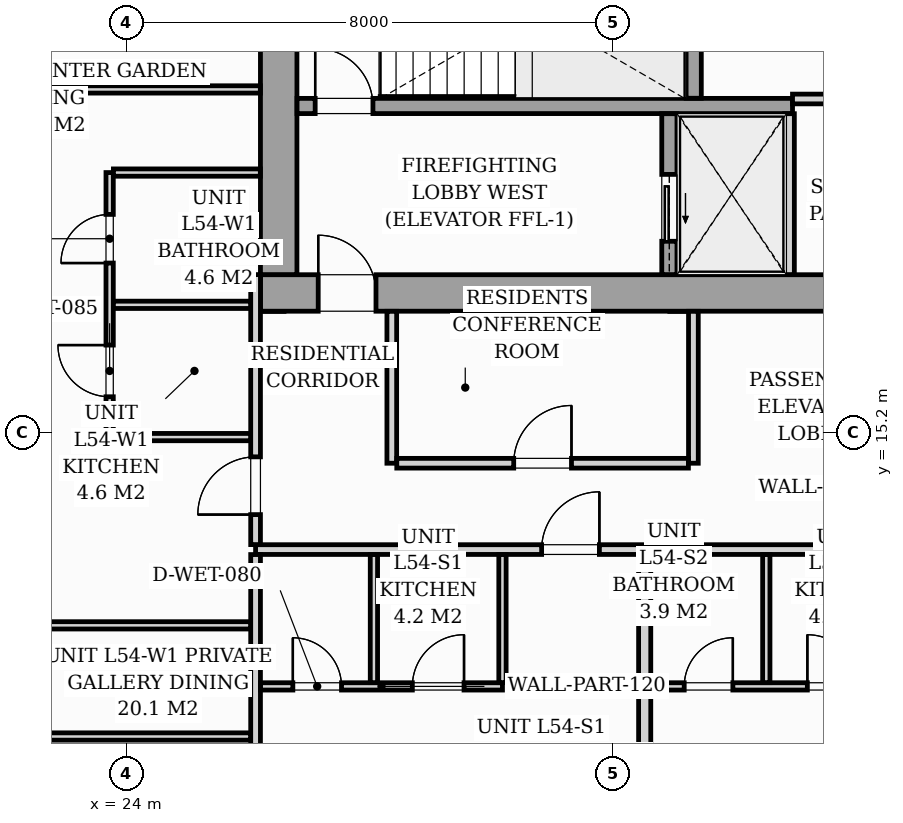
"""IFC4 building model, lengths in metres.
Left out: names, types, materials, properties, quantities, classifications, styles, units other than length and angle.
Written with IfcOpenShell. Run it as: python <this file> out.ifc"""

import sys

from ifc_helpers import new_model, si_unit, direction, frame, frame_2d, origin, origin_2d, place, context, subcontext, project, spatial, rectangle, i_section, extrude, source, transform, mapped, element, fill, save


model = new_model("IFC4")
c1 = context("Model", 3, precision=1e-05, world=origin(), true_north=direction((0.0, 1.0)))
c2 = subcontext(c1, "Body", "Model", "MODEL_VIEW")
j1 = project(units=[si_unit("LENGTHUNIT", "METRE"), si_unit("PLANEANGLEUNIT", "RADIAN")], contexts=[c1])
p1 = place(None, origin())
s1 = spatial("IfcSite", under=j1, at=p1, CompositionType="ELEMENT")
p2 = place(p1, origin())
s2 = spatial("IfcBuilding", under=s1, at=p2, CompositionType="ELEMENT")
p3 = place(p2, frame((0.0, 0.0, 189.0)))
s3 = spatial("IfcBuildingStorey", under=s2, at=p3, CompositionType="ELEMENT", Elevation=189.0)
m1 = source(origin(), c2, "Body", "SweptSolid", [
    extrude(i_section(OverallWidth=0.416, OverallDepth=0.446, WebThickness=0.039, FlangeThickness=0.063, FilletRadius=0.018, at=origin_2d()), origin(), (0.0, 0.0, 1.0), 3.196),
])
for number, where, z_axis, x_axis in (
    (1, (26.4, 17.4, 0.002), (0.0, 0.0, 1.0), (1.0, 0.0, 0.0)),
    (2, (33.12, 17.4, 0.002), (0.0, 0.0, 1.0), (1.0, 0.0, 0.0)),
):
    element("IfcColumn", number, at=place(p3, frame(where, z_axis=z_axis, x_axis=x_axis)), inside=s3, PredefinedType="PILASTER", context=c2, shape_type="MappedRepresentation", body=[
        mapped(m1, transform((0.0, 0.0, 0.0), scale=1.0)),
    ])
p4 = place(p3, frame((26.2, 17.5, 0.0), z_axis=(0.0, 0.0, 1.0), x_axis=(1.0, 0.0, 0.0)))
e3 = element("IfcWall", 3, at=p4, inside=s3, PredefinedType="SHEAR", context=c2, shape_type="SweptSolid", body=[
    extrude(rectangle(XDim=19.6, YDim=0.6, at=frame_2d((9.8, 0.0))), origin(), (0.0, 0.0, 1.0), 3.2),
])
p5 = place(p4, frame((0.95, 0.0, 0.0)))
e4 = element("IfcOpeningElement", 4, at=p5, cuts=e3, PredefinedType="OPENING", context=c2, shape_type="SweptSolid", body=[
    extrude(rectangle(XDim=0.95, YDim=2.06, at=frame_2d((0.475, 1.03))), frame((0.0, 0.31, 0.0), z_axis=(0.0, -1.0, 0.0), x_axis=(1.0, 0.0, 0.0)), (0.0, 0.0, 1.0), 0.62),
])
p6 = place(p4, frame((9.38, 0.0, 0.0)))
e5 = element("IfcOpeningElement", 5, at=p6, cuts=e3, PredefinedType="OPENING", context=c2, shape_type="SweptSolid", body=[
    extrude(rectangle(XDim=0.85, YDim=2.0, at=frame_2d((0.425, 1.0))), frame((0.0, 0.31, 0.0), z_axis=(0.0, -1.0, 0.0), x_axis=(1.0, 0.0, 0.0)), (0.0, 0.0, 1.0), 0.62),
])
p7 = place(p4, frame((17.55, 0.0, 0.0)))
e6 = element("IfcOpeningElement", 6, at=p7, cuts=e3, PredefinedType="OPENING", context=c2, shape_type="SweptSolid", body=[
    extrude(rectangle(XDim=0.95, YDim=2.06, at=frame_2d((0.475, 1.03))), frame((0.0, 0.31, 0.0), z_axis=(0.0, -1.0, 0.0), x_axis=(1.0, 0.0, 0.0)), (0.0, 0.0, 1.0), 0.62),
])
p8 = place(p3, frame((26.5, 17.802, 0.0), z_axis=(0.0, 0.0, 1.0), x_axis=(0.0, 1.0, 0.0)))
e7 = element("IfcWall", 7, at=p8, inside=s3, PredefinedType="SHEAR", context=c2, shape_type="SweptSolid", body=[
    extrude(rectangle(XDim=5.796, YDim=0.6, at=frame_2d((2.898, 0.0))), origin(), (0.0, 0.0, 1.0), 3.2),
])
p9 = place(p3, frame((26.802, 20.575, 0.0), z_axis=(0.0, 0.0, 1.0), x_axis=(1.0, 0.0, 0.0)))
e8 = element("IfcWall", 8, at=p9, inside=s3, PredefinedType="SOLIDWALL", context=c2, shape_type="SweptSolid", body=[
    extrude(rectangle(XDim=8.148, YDim=0.25, at=frame_2d((4.074, 0.0))), origin(), (0.0, 0.0, 1.0), 3.2),
])
p10 = place(p9, frame((0.298, 0.0, 0.0)))
e9 = element("IfcOpeningElement", 9, at=p10, cuts=e8, PredefinedType="OPENING", context=c2, shape_type="SweptSolid", body=[
    extrude(rectangle(XDim=0.95, YDim=2.06, at=frame_2d((0.475, 1.03))), frame((0.0, 0.135, 0.0), z_axis=(0.0, -1.0, 0.0), x_axis=(1.0, 0.0, 0.0)), (0.0, 0.0, 1.0), 0.27),
])
p11 = place(p3, frame((33.325, 20.702, 0.0), z_axis=(0.0, 0.0, 1.0), x_axis=(0.0, 1.0, 0.0)))
e10 = element("IfcWall", 10, at=p11, inside=s3, PredefinedType="SOLIDWALL", context=c2, shape_type="SweptSolid", body=[
    extrude(rectangle(XDim=2.896, YDim=0.25, at=frame_2d((1.448, 0.0))), origin(), (0.0, 0.0, 1.0), 3.2),
])
p12 = place(p3, frame((32.925, 17.802, 0.0), z_axis=(0.0, 0.0, 1.0), x_axis=(0.0, 1.0, 0.0)))
e11 = element("IfcWall", 11, at=p12, inside=s3, PredefinedType="SOLIDWALL", context=c2, shape_type="SweptSolid", body=[
    extrude(rectangle(XDim=2.646, YDim=0.25, at=frame_2d((1.323, 0.0))), origin(), (0.0, 0.0, 1.0), 3.2),
])
p13 = place(p12, frame((0.548, 0.0, 0.0)))
e12 = element("IfcOpeningElement", 12, at=p13, cuts=e11, PredefinedType="OPENING", context=c2, shape_type="SweptSolid", body=[
    extrude(rectangle(XDim=1.1, YDim=2.08, at=frame_2d((0.55, 1.04))), frame((0.0, 0.135, 0.0), z_axis=(0.0, -1.0, 0.0), x_axis=(1.0, 0.0, 0.0)), (0.0, 0.0, 1.0), 0.27),
])
p14 = place(p3, frame((34.9, 17.802, 0.0), z_axis=(0.0, 0.0, 1.0), x_axis=(0.0, 1.0, 0.0)))
e13 = element("IfcWall", 13, at=p14, inside=s3, PredefinedType="PARTITIONING", context=c2, shape_type="SweptSolid", body=[
    extrude(rectangle(XDim=2.646, YDim=0.16, at=frame_2d((1.323, 0.0))), origin(), (0.0, 0.0, 1.0), 2.94),
])
p15 = place(p3, frame((34.95, 20.69, 0.0), z_axis=(0.0, 0.0, 1.0), x_axis=(1.0, 0.0, 0.0)))
e14 = element("IfcWall", 14, at=p15, inside=s3, PredefinedType="PARTITIONING", context=c2, shape_type="SweptSolid", body=[
    extrude(rectangle(XDim=2.1, YDim=0.16, at=frame_2d((1.05, 0.0))), origin(), (0.0, 0.0, 1.0), 2.94),
])
p16 = place(p15, frame((0.65, 0.0, 0.0)))
e15 = element("IfcOpeningElement", 15, at=p16, cuts=e14, PredefinedType="OPENING", context=c2, shape_type="SweptSolid", body=[
    extrude(rectangle(XDim=0.8, YDim=2.05, at=frame_2d((0.4, 1.025))), frame((0.0, 0.09, 0.0), z_axis=(0.0, -1.0, 0.0), x_axis=(1.0, 0.0, 0.0)), (0.0, 0.0, 1.0), 0.18),
])
p17 = place(p3, frame((26.12, 13.28, 0.0), z_axis=(0.0, 0.0, 1.0), x_axis=(1.0, 0.0, 0.0)))
e16 = element("IfcWall", 16, at=p17, inside=s3, PredefinedType="PARTITIONING", context=c2, shape_type="SweptSolid", body=[
    extrude(rectangle(XDim=21.33, YDim=0.16, at=frame_2d((10.665, 0.0))), origin(), (0.0, 0.0, 1.0), 2.94),
])
p18 = place(p17, frame((4.704, 0.0, 0.0)))
e17 = element("IfcOpeningElement", 17, at=p18, cuts=e16, PredefinedType="OPENING", context=c2, shape_type="SweptSolid", body=[
    extrude(rectangle(XDim=0.95, YDim=2.06, at=frame_2d((0.475, 1.03))), frame((0.0, 0.09, 0.0), z_axis=(0.0, -1.0, 0.0), x_axis=(1.0, 0.0, 0.0)), (0.0, 0.0, 1.0), 0.18),
])
p19 = place(p17, frame((11.6, 0.0, 0.0)))
e18 = element("IfcOpeningElement", 18, at=p19, cuts=e16, PredefinedType="OPENING", context=c2, shape_type="SweptSolid", body=[
    extrude(rectangle(XDim=0.95, YDim=2.06, at=frame_2d((0.475, 1.03))), frame((0.0, 0.09, 0.0), z_axis=(0.0, -1.0, 0.0), x_axis=(1.0, 0.0, 0.0)), (0.0, 0.0, 1.0), 0.18),
])
p20 = place(p17, frame((14.976, 0.0, 0.0)))
e19 = element("IfcOpeningElement", 19, at=p20, cuts=e16, PredefinedType="OPENING", context=c2, shape_type="SweptSolid", body=[
    extrude(rectangle(XDim=0.95, YDim=2.06, at=frame_2d((0.475, 1.03))), frame((0.0, 0.09, 0.0), z_axis=(0.0, -1.0, 0.0), x_axis=(1.0, 0.0, 0.0)), (0.0, 0.0, 1.0), 0.18),
])
p21 = place(p3, frame((26.12, 7.261, 0.0), z_axis=(0.0, 0.0, 1.0), x_axis=(0.0, 1.0, 0.0)))
e20 = element("IfcWall", 20, at=p21, inside=s3, PredefinedType="PARTITIONING", context=c2, shape_type="SweptSolid", body=[
    extrude(rectangle(XDim=5.937, YDim=0.16, at=frame_2d((2.968, 0.0))), origin(), (0.0, 0.0, 1.0), 2.94),
])
p22 = place(p3, frame((26.12, 13.362, 0.0), z_axis=(0.0, 0.0, 1.0), x_axis=(0.0, 1.0, 0.0)))
e21 = element("IfcWall", 21, at=p22, inside=s3, PredefinedType="PARTITIONING", context=c2, shape_type="SweptSolid", body=[
    extrude(rectangle(XDim=4.44, YDim=0.16, at=frame_2d((2.22, 0.0))), origin(), (0.0, 0.0, 1.0), 2.94),
])
p23 = place(p22, frame((0.493, 0.0, 0.0)))
e22 = element("IfcOpeningElement", 22, at=p23, cuts=e21, PredefinedType="OPENING", context=c2, shape_type="SweptSolid", body=[
    extrude(rectangle(XDim=0.95, YDim=2.06, at=frame_2d((0.475, 1.03))), frame((0.0, 0.09, 0.0), z_axis=(0.0, -1.0, 0.0), x_axis=(1.0, 0.0, 0.0)), (0.0, 0.0, 1.0), 0.18),
])
p24 = place(p3, frame((26.202, 11.03, 0.0), z_axis=(0.0, 0.0, 1.0), x_axis=(1.0, 0.0, 0.0)))
e23 = element("IfcWall", 23, at=p24, inside=s3, PredefinedType="PARTITIONING", context=c2, shape_type="SweptSolid", body=[
    extrude(rectangle(XDim=3.978, YDim=0.12, at=frame_2d((1.989, 0.0))), origin(), (0.0, 0.0, 1.0), 2.94),
])
p25 = place(p24, frame((0.531, 0.0, 0.0)))
e24 = element("IfcOpeningElement", 24, at=p25, cuts=e23, PredefinedType="OPENING", context=c2, shape_type="SweptSolid", body=[
    extrude(rectangle(XDim=0.8, YDim=2.02, at=frame_2d((0.4, 1.01))), frame((0.0, 0.07, 0.0), z_axis=(0.0, -1.0, 0.0), x_axis=(1.0, 0.0, 0.0)), (0.0, 0.0, 1.0), 0.14),
])
p26 = place(p24, frame((2.496, 0.0, 0.0)))
e25 = element("IfcOpeningElement", 25, at=p26, cuts=e23, PredefinedType="OPENING", context=c2, shape_type="SweptSolid", body=[
    extrude(rectangle(XDim=0.85, YDim=2.05, at=frame_2d((0.425, 1.025))), frame((0.0, 0.07, 0.0), z_axis=(0.0, -1.0, 0.0), x_axis=(1.0, 0.0, 0.0)), (0.0, 0.0, 1.0), 0.14),
])
for number, where, z_axis, x_axis in (
    (26, (30.18, 11.092, 0.0), (0.0, 0.0, 1.0), (0.0, 1.0, 0.0)),
    (27, (28.066, 11.092, 0.0), (0.0, 0.0, 1.0), (0.0, 1.0, 0.0)),
):
    element("IfcWall", number, at=place(p3, frame(where, z_axis=z_axis, x_axis=x_axis)), inside=s3, PredefinedType="PARTITIONING", context=c2, shape_type="SweptSolid", body=[
        extrude(rectangle(XDim=2.106, YDim=0.12, at=frame_2d((1.053, 0.0))), origin(), (0.0, 0.0, 1.0), 2.94),
    ])
p27 = place(p3, frame((32.519, 7.877, 0.0), z_axis=(0.0, 0.0, 1.0), x_axis=(0.0, 1.0, 0.0)))
e28 = element("IfcWall", 28, at=p27, inside=s3, PredefinedType="PARTITIONING", context=c2, shape_type="SweptSolid", body=[
    extrude(rectangle(XDim=5.321, YDim=0.2, at=frame_2d((2.66, 0.0))), origin(), (0.0, 0.0, 1.0), 2.94),
])
p28 = place(p3, frame((32.621, 11.03, 0.0), z_axis=(0.0, 0.0, 1.0), x_axis=(1.0, 0.0, 0.0)))
e29 = element("IfcWall", 29, at=p28, inside=s3, PredefinedType="PARTITIONING", context=c2, shape_type="SweptSolid", body=[
    extrude(rectangle(XDim=4.098, YDim=0.12, at=frame_2d((2.049, 0.0))), origin(), (0.0, 0.0, 1.0), 2.94),
])
p29 = place(p28, frame((0.548, 0.0, 0.0)))
e30 = element("IfcOpeningElement", 30, at=p29, cuts=e29, PredefinedType="OPENING", context=c2, shape_type="SweptSolid", body=[
    extrude(rectangle(XDim=0.8, YDim=2.02, at=frame_2d((0.4, 1.01))), frame((0.0, 0.07, 0.0), z_axis=(0.0, -1.0, 0.0), x_axis=(1.0, 0.0, 0.0)), (0.0, 0.0, 1.0), 0.14),
])
p30 = place(p28, frame((2.573, 0.0, 0.0)))
e31 = element("IfcOpeningElement", 31, at=p30, cuts=e29, PredefinedType="OPENING", context=c2, shape_type="SweptSolid", body=[
    extrude(rectangle(XDim=0.85, YDim=2.05, at=frame_2d((0.425, 1.025))), frame((0.0, 0.07, 0.0), z_axis=(0.0, -1.0, 0.0), x_axis=(1.0, 0.0, 0.0)), (0.0, 0.0, 1.0), 0.14),
])
p31 = place(p3, frame((34.519, 11.092, 0.0), z_axis=(0.0, 0.0, 1.0), x_axis=(0.0, 1.0, 0.0)))
e32 = element("IfcWall", 32, at=p31, inside=s3, PredefinedType="PARTITIONING", context=c2, shape_type="SweptSolid", body=[
    extrude(rectangle(XDim=2.106, YDim=0.12, at=frame_2d((1.053, 0.0))), origin(), (0.0, 0.0, 1.0), 2.94),
])
p32 = place(p3, frame((23.72, 15.13, 0.0), z_axis=(0.0, 0.0, 1.0), x_axis=(0.0, 1.0, 0.0)))
e33 = element("IfcWall", 33, at=p32, inside=s3, PredefinedType="PARTITIONING", context=c2, shape_type="SweptSolid", body=[
    extrude(rectangle(XDim=4.35, YDim=0.12, at=frame_2d((2.175, 0.0))), origin(), (0.0, 0.0, 1.0), 2.94),
])
p33 = place(p32, frame((0.663, 0.0, 0.0)))
e34 = element("IfcOpeningElement", 34, at=p33, cuts=e33, PredefinedType="OPENING", context=c2, shape_type="SweptSolid", body=[
    extrude(rectangle(XDim=0.85, YDim=2.05, at=frame_2d((0.425, 1.025))), frame((0.0, 0.07, 0.0), z_axis=(0.0, -1.0, 0.0), x_axis=(1.0, 0.0, 0.0)), (0.0, 0.0, 1.0), 0.14),
])
p34 = place(p32, frame((2.862, 0.0, 0.0)))
e35 = element("IfcOpeningElement", 35, at=p34, cuts=e33, PredefinedType="OPENING", context=c2, shape_type="SweptSolid", body=[
    extrude(rectangle(XDim=0.8, YDim=2.02, at=frame_2d((0.4, 1.01))), frame((0.0, 0.07, 0.0), z_axis=(0.0, -1.0, 0.0), x_axis=(1.0, 0.0, 0.0)), (0.0, 0.0, 1.0), 0.14),
])
p35 = place(p3, frame((23.782, 17.305, 0.0), z_axis=(0.0, 0.0, 1.0), x_axis=(1.0, 0.0, 0.0)))
e36 = element("IfcWall", 36, at=p35, inside=s3, PredefinedType="PARTITIONING", context=c2, shape_type="SweptSolid", body=[
    extrude(rectangle(XDim=2.256, YDim=0.12, at=frame_2d((1.128, 0.0))), origin(), (0.0, 0.0, 1.0), 2.281),
])
p36 = place(p3, frame((23.782, 15.13, 0.0), z_axis=(0.0, 0.0, 1.0), x_axis=(1.0, 0.0, 0.0)))
e37 = element("IfcWall", 37, at=p36, inside=s3, PredefinedType="PARTITIONING", context=c2, shape_type="SweptSolid", body=[
    extrude(rectangle(XDim=2.256, YDim=0.12, at=frame_2d((1.128, 0.0))), origin(), (0.0, 0.0, 1.0), 2.94),
])
p37 = place(p3, frame((23.782, 19.48, 0.0), z_axis=(0.0, 0.0, 1.0), x_axis=(1.0, 0.0, 0.0)))
e38 = element("IfcWall", 38, at=p37, inside=s3, PredefinedType="PARTITIONING", context=c2, shape_type="SweptSolid", body=[
    extrude(rectangle(XDim=2.416, YDim=0.12, at=frame_2d((1.208, 0.0))), origin(), (0.0, 0.0, 1.0), 2.94),
])
p38 = place(p3, frame((14.365, 10.206, 0.0), z_axis=(0.0, 0.0, 1.0), x_axis=(1.0, 0.0, 0.0)))
e39 = element("IfcWall", 39, at=p38, inside=s3, PredefinedType="PARTITIONING", context=c2, shape_type="SweptSolid", body=[
    extrude(rectangle(XDim=11.673, YDim=0.12, at=frame_2d((5.837, 0.0))), origin(), (0.0, 0.0, 1.0), 2.94),
])
p39 = place(p38, frame((5.405, 0.0, 0.0)))
e40 = element("IfcOpeningElement", 40, at=p39, cuts=e39, PredefinedType="OPENING", context=c2, shape_type="SweptSolid", body=[
    extrude(rectangle(XDim=0.85, YDim=2.05, at=frame_2d((0.425, 1.025))), frame((0.0, 0.07, 0.0), z_axis=(0.0, -1.0, 0.0), x_axis=(1.0, 0.0, 0.0)), (0.0, 0.0, 1.0), 0.14),
])
p40 = place(p3, frame((14.189, 12.034, 0.0), z_axis=(0.0, 0.0, 1.0), x_axis=(1.0, 0.0, 0.0)))
e41 = element("IfcWall", 41, at=p40, inside=s3, PredefinedType="PARTITIONING", context=c2, shape_type="SweptSolid", body=[
    extrude(rectangle(XDim=11.849, YDim=0.12, at=frame_2d((5.925, 0.0))), origin(), (0.0, 0.0, 1.0), 2.94),
])
p41 = place(p40, frame((5.493, 0.0, 0.0)))
e42 = element("IfcOpeningElement", 42, at=p41, cuts=e41, PredefinedType="OPENING", context=c2, shape_type="SweptSolid", body=[
    extrude(rectangle(XDim=0.85, YDim=2.05, at=frame_2d((0.425, 1.025))), frame((0.0, 0.07, 0.0), z_axis=(0.0, -1.0, 0.0), x_axis=(1.0, 0.0, 0.0)), (0.0, 0.0, 1.0), 0.14),
])
p42 = place(p3, frame((13.34, 20.847, 0.0), z_axis=(0.0, 0.0, 1.0), x_axis=(1.0, 0.0, 0.0)))
e43 = element("IfcWall", 43, at=p42, inside=s3, PredefinedType="PARTITIONING", context=c2, shape_type="SweptSolid", body=[
    extrude(rectangle(XDim=12.858, YDim=0.12, at=frame_2d((6.429, 0.0))), origin(), (0.0, 0.0, 1.0), 2.94),
])
p43 = place(p42, frame((5.875, 0.0, 0.0)))
e44 = element("IfcOpeningElement", 44, at=p43, cuts=e43, PredefinedType="OPENING", context=c2, shape_type="SweptSolid", body=[
    extrude(rectangle(XDim=0.85, YDim=2.05, at=frame_2d((0.425, 1.025))), frame((0.0, 0.07, 0.0), z_axis=(0.0, -1.0, 0.0), x_axis=(1.0, 0.0, 0.0)), (0.0, 0.0, 1.0), 0.14),
])
for number, where, z_axis, x_axis in (
    (45, (28.36, 14.7, 0.0), (0.0, 0.0, 1.0), (0.0, 1.0, 0.0)),
    (46, (33.32, 14.7, 0.0), (0.0, 0.0, 1.0), (0.0, 1.0, 0.0)),
):
    element("IfcWall", number, at=place(p3, frame(where, z_axis=z_axis, x_axis=x_axis)), inside=s3, PredefinedType="PARTITIONING", context=c2, shape_type="SweptSolid", body=[
        extrude(rectangle(XDim=2.498, YDim=0.16, at=frame_2d((1.249, 0.0))), origin(), (0.0, 0.0, 1.0), 2.94),
    ])
p44 = place(p3, frame((28.442, 14.7, 0.0), z_axis=(0.0, 0.0, 1.0), x_axis=(1.0, 0.0, 0.0)))
e47 = element("IfcWall", 47, at=p44, inside=s3, PredefinedType="PARTITIONING", context=c2, shape_type="SweptSolid", body=[
    extrude(rectangle(XDim=4.796, YDim=0.16, at=frame_2d((2.398, 0.0))), origin(), (0.0, 0.0, 1.0), 2.94),
])
p45 = place(p44, frame((1.923, 0.0, 0.0)))
e48 = element("IfcOpeningElement", 48, at=p45, cuts=e47, PredefinedType="OPENING", context=c2, shape_type="SweptSolid", body=[
    extrude(rectangle(XDim=0.95, YDim=2.06, at=frame_2d((0.475, 1.03))), frame((0.0, 0.09, 0.0), z_axis=(0.0, -1.0, 0.0), x_axis=(1.0, 0.0, 0.0)), (0.0, 0.0, 1.0), 0.18),
])
m2 = source(origin(), c2, "Body", "SweptSolid", [
    extrude(rectangle(XDim=0.95, YDim=2.06, at=frame_2d((0.475, 1.03))), frame((0.0, 0.025, 0.0), z_axis=(0.0, -1.0, 0.0), x_axis=(1.0, 0.0, 0.0)), (0.0, 0.0, 1.0), 0.05),
])
p46 = place(p5, origin())
e49 = element("IfcDoor", 49, at=p46, inside=s3, OperationType="SINGLE_SWING_LEFT", PredefinedType="DOOR", context=c2, shape_type="MappedRepresentation", body=[
    mapped(m2, transform((0.0, 0.0, 0.0), scale=1.0)),
])
fill(e4, e49)
p47 = place(p10, origin())
e50 = element("IfcDoor", 50, at=p47, inside=s3, OperationType="SINGLE_SWING_LEFT", PredefinedType="DOOR", context=c2, shape_type="MappedRepresentation", body=[
    mapped(m2, transform((0.0, 0.0, 0.0), scale=1.0)),
])
fill(e9, e50)
m3 = source(origin(), c2, "Body", "SweptSolid", [
    extrude(rectangle(XDim=1.1, YDim=2.08, at=frame_2d((0.55, 1.04))), frame((0.0, 0.025, 0.0), z_axis=(0.0, -1.0, 0.0), x_axis=(1.0, 0.0, 0.0)), (0.0, 0.0, 1.0), 0.05),
])
p48 = place(p13, origin())
e51 = element("IfcDoor", 51, at=p48, inside=s3, OperationType="SLIDING_TO_LEFT", PredefinedType="DOOR", context=c2, shape_type="MappedRepresentation", body=[
    mapped(m3, transform((0.0, 0.0, 0.0), scale=1.0)),
])
fill(e12, e51)
m4 = source(origin(), c2, "Body", "SweptSolid", [
    extrude(rectangle(XDim=0.95, YDim=2.06, at=frame_2d((0.475, 1.03))), frame((0.0, 0.025, 0.0), z_axis=(0.0, -1.0, 0.0), x_axis=(1.0, 0.0, 0.0)), (0.0, 0.0, 1.0), 0.05),
])
p49 = place(p18, origin())
e52 = element("IfcDoor", 52, at=p49, inside=s3, OperationType="SINGLE_SWING_RIGHT", PredefinedType="DOOR", context=c2, shape_type="MappedRepresentation", body=[
    mapped(m4, transform((0.0, 0.0, 0.0), scale=1.0)),
])
fill(e17, e52)
m5 = source(origin(), c2, "Body", "SweptSolid", [
    extrude(rectangle(XDim=0.8, YDim=2.02, at=frame_2d((0.4, 1.01))), frame((0.0, 0.025, 0.0), z_axis=(0.0, -1.0, 0.0), x_axis=(1.0, 0.0, 0.0)), (0.0, 0.0, 1.0), 0.05),
])
p50 = place(p25, origin())
e53 = element("IfcDoor", 53, at=p50, inside=s3, OperationType="SINGLE_SWING_LEFT", PredefinedType="DOOR", context=c2, shape_type="MappedRepresentation", body=[
    mapped(m5, transform((0.0, 0.0, 0.0), scale=1.0)),
])
fill(e24, e53)
m6 = source(origin(), c2, "Body", "SweptSolid", [
    extrude(rectangle(XDim=0.85, YDim=2.05, at=frame_2d((0.425, 1.025))), frame((0.0, 0.025, 0.0), z_axis=(0.0, -1.0, 0.0), x_axis=(1.0, 0.0, 0.0)), (0.0, 0.0, 1.0), 0.05),
])
p51 = place(p26, origin())
e54 = element("IfcDoor", 54, at=p51, inside=s3, OperationType="SINGLE_SWING_RIGHT", PredefinedType="DOOR", context=c2, shape_type="MappedRepresentation", body=[
    mapped(m6, transform((0.0, 0.0, 0.0), scale=1.0)),
])
fill(e25, e54)
p52 = place(p29, origin())
e55 = element("IfcDoor", 55, at=p52, inside=s3, OperationType="SINGLE_SWING_RIGHT", PredefinedType="DOOR", context=c2, shape_type="MappedRepresentation", body=[
    mapped(m5, transform((0.0, 0.0, 0.0), scale=1.0)),
])
fill(e30, e55)
p53 = place(p30, origin())
e56 = element("IfcDoor", 56, at=p53, inside=s3, OperationType="SINGLE_SWING_LEFT", PredefinedType="DOOR", context=c2, shape_type="MappedRepresentation", body=[
    mapped(m6, transform((0.0, 0.0, 0.0), scale=1.0)),
])
fill(e31, e56)
p54 = place(p23, origin())
e57 = element("IfcDoor", 57, at=p54, inside=s3, OperationType="SINGLE_SWING_LEFT", PredefinedType="DOOR", context=c2, shape_type="MappedRepresentation", body=[
    mapped(m4, transform((0.0, 0.0, 0.0), scale=1.0)),
])
fill(e22, e57)
p55 = place(p33, origin())
e58 = element("IfcDoor", 58, at=p55, inside=s3, OperationType="SINGLE_SWING_RIGHT", PredefinedType="DOOR", context=c2, shape_type="MappedRepresentation", body=[
    mapped(m6, transform((0.0, 0.0, 0.0), scale=1.0)),
])
fill(e34, e58)
p56 = place(p34, origin())
e59 = element("IfcDoor", 59, at=p56, inside=s3, OperationType="SINGLE_SWING_LEFT", PredefinedType="DOOR", context=c2, shape_type="MappedRepresentation", body=[
    mapped(m5, transform((0.0, 0.0, 0.0), scale=1.0)),
])
fill(e35, e59)
p57 = place(p45, origin())
e60 = element("IfcDoor", 60, at=p57, inside=s3, OperationType="SINGLE_SWING_RIGHT", PredefinedType="DOOR", context=c2, shape_type="MappedRepresentation", body=[
    mapped(m4, transform((0.0, 0.0, 0.0), scale=1.0)),
])
fill(e48, e60)
save(model, sys.argv[1])
